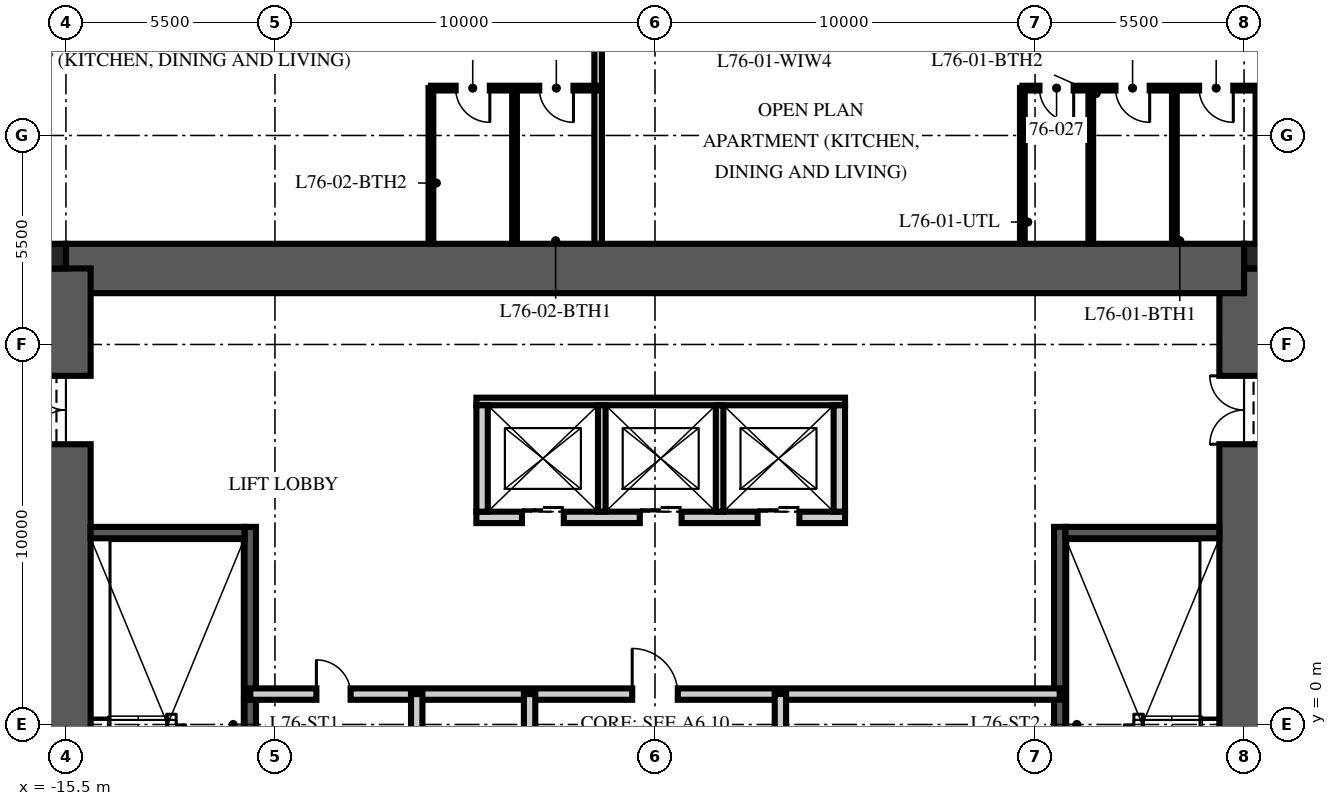
"""IFC4 building model, lengths in metres.
Left out: names, types, materials, properties, quantities, classifications, styles, units other than length and angle.
Written with IfcOpenShell. Run it as: python <this file> out.ifc"""

import sys

from ifc_helpers import new_model, si_unit, direction, frame, frame_2d, origin, origin_2d, place, context, subcontext, project, spatial, rectangle, extrude, element, fill, save


model = new_model("IFC4")
c1 = context("Model", 3, precision=1e-05, world=origin(), true_north=direction((0.0, 1.0)))
c2 = subcontext(c1, "Body", "Model", "MODEL_VIEW")
j1 = project(units=[si_unit("LENGTHUNIT", "METRE"), si_unit("PLANEANGLEUNIT", "RADIAN")], contexts=[c1])
p1 = place(None, origin())
s1 = spatial("IfcSite", under=j1, at=p1, CompositionType="ELEMENT")
p2 = place(p1, origin())
s2 = spatial("IfcBuilding", under=s1, at=p2, CompositionType="ELEMENT")
p3 = place(p2, frame((0.0, 0.0, 304.5)))
s3 = spatial("IfcBuildingStorey", under=s2, at=p3, CompositionType="ELEMENT", Elevation=304.5)
p4 = place(p3, frame((15.5, -12.0, -0.25), z_axis=(0.0, 0.0, 1.0), x_axis=(0.0, 1.0, 0.0)))
e1 = element("IfcWall", 1, at=p4, inside=s3, PredefinedType="SHEAR", context=c2, shape_type="SweptSolid", body=[
    extrude(rectangle(XDim=24.0, YDim=1.3, at=frame_2d((12.0, 0.0))), origin(), (0.0, 0.0, 1.0), 3.75),
])
p5 = place(p4, frame((3.125, 0.0, 0.25)))
e2 = element("IfcOpeningElement", 2, at=p5, cuts=e1, PredefinedType="OPENING", context=c2, shape_type="SweptSolid", body=[
    extrude(rectangle(XDim=1.2, YDim=2.1, at=frame_2d((0.6, 1.05))), frame((0.0, 0.66, 0.0), z_axis=(0.0, -1.0, 0.0), x_axis=(1.0, 0.0, 0.0)), (0.0, 0.0, 1.0), 1.32),
])
p6 = place(p4, frame((19.375, 0.0, 0.25)))
e3 = element("IfcOpeningElement", 3, at=p6, cuts=e1, PredefinedType="OPENING", context=c2, shape_type="SweptSolid", body=[
    extrude(rectangle(XDim=1.8, YDim=2.1, at=frame_2d((0.9, 1.05))), frame((0.0, 0.66, 0.0), z_axis=(0.0, -1.0, 0.0), x_axis=(1.0, 0.0, 0.0)), (0.0, 0.0, 1.0), 1.32),
])
p7 = place(p3, frame((-15.5, 12.0, -0.25), z_axis=(0.0, 0.0, 1.0), x_axis=(1.0, 0.0, 0.0)))
e4 = element("IfcWall", 4, at=p7, inside=s3, PredefinedType="SHEAR", context=c2, shape_type="SweptSolid", body=[
    extrude(rectangle(XDim=31.0, YDim=1.3, at=frame_2d((15.5, 0.0))), origin(), (0.0, 0.0, 1.0), 3.75),
])
p8 = place(p3, frame((-15.5, -12.0, -0.25), z_axis=(0.0, 0.0, 1.0), x_axis=(0.0, 1.0, 0.0)))
e5 = element("IfcWall", 5, at=p8, inside=s3, PredefinedType="SHEAR", context=c2, shape_type="SweptSolid", body=[
    extrude(rectangle(XDim=24.0, YDim=1.3, at=frame_2d((12.0, 0.0))), origin(), (0.0, 0.0, 1.0), 3.75),
])
p9 = place(p8, frame((3.125, 0.0, 0.25)))
e6 = element("IfcOpeningElement", 6, at=p9, cuts=e5, PredefinedType="OPENING", context=c2, shape_type="SweptSolid", body=[
    extrude(rectangle(XDim=1.2, YDim=2.1, at=frame_2d((0.6, 1.05))), frame((0.0, 0.66, 0.0), z_axis=(0.0, -1.0, 0.0), x_axis=(1.0, 0.0, 0.0)), (0.0, 0.0, 1.0), 1.32),
])
p10 = place(p8, frame((19.375, 0.0, 0.25)))
e7 = element("IfcOpeningElement", 7, at=p10, cuts=e5, PredefinedType="OPENING", context=c2, shape_type="SweptSolid", body=[
    extrude(rectangle(XDim=1.8, YDim=2.1, at=frame_2d((0.9, 1.05))), frame((0.0, 0.66, 0.0), z_axis=(0.0, -1.0, 0.0), x_axis=(1.0, 0.0, 0.0)), (0.0, 0.0, 1.0), 1.32),
])
for number, where, z_axis, x_axis in (
    (8, (15.825, 12.325, -0.25), (0.0, 0.0, 1.0), (1.0, 0.0, 0.0)),
    (9, (-15.825, 12.325, -0.25), (0.0, 0.0, 1.0), (1.0, 0.0, 0.0)),
):
    element("IfcColumn", number, at=place(p3, frame(where, z_axis=z_axis, x_axis=x_axis)), inside=s3, PredefinedType="COLUMN", context=c2, shape_type="SweptSolid", body=[
        extrude(rectangle(XDim=0.65, YDim=0.65, at=origin_2d()), origin(), (0.0, 0.0, 1.0), 3.75),
    ])
p11 = place(p3, frame((-10.65, -4.9, 0.0), z_axis=(0.0, 0.0, 1.0), x_axis=(0.0, 1.0, 0.0)))
e10 = element("IfcWall", 10, at=p11, inside=s3, PredefinedType="SOLIDWALL", context=c2, shape_type="SweptSolid", body=[
    extrude(rectangle(XDim=10.1, YDim=0.3, at=frame_2d((5.05, 0.0))), origin(), (0.0, 0.0, 1.0), 3.5),
])
p12 = place(p3, frame((-14.85, 5.05, 0.0), z_axis=(0.0, 0.0, 1.0), x_axis=(1.0, 0.0, 0.0)))
e11 = element("IfcWall", 11, at=p12, inside=s3, PredefinedType="SOLIDWALL", context=c2, shape_type="SweptSolid", body=[
    extrude(rectangle(XDim=4.05, YDim=0.3, at=frame_2d((2.025, 0.0))), origin(), (0.0, 0.0, 1.0), 3.5),
])
p13 = place(p3, frame((10.65, -4.9, 0.0), z_axis=(0.0, 0.0, 1.0), x_axis=(0.0, 1.0, 0.0)))
e12 = element("IfcWall", 12, at=p13, inside=s3, PredefinedType="SOLIDWALL", context=c2, shape_type="SweptSolid", body=[
    extrude(rectangle(XDim=10.1, YDim=0.3, at=frame_2d((5.05, 0.0))), origin(), (0.0, 0.0, 1.0), 3.5),
])
p14 = place(p3, frame((14.85, 5.05, 0.0), z_axis=(0.0, 0.0, 1.0), x_axis=(-1.0, 0.0, 0.0)))
e13 = element("IfcWall", 13, at=p14, inside=s3, PredefinedType="SOLIDWALL", context=c2, shape_type="SweptSolid", body=[
    extrude(rectangle(XDim=4.05, YDim=0.3, at=frame_2d((2.025, 0.0))), origin(), (0.0, 0.0, 1.0), 3.5),
])
p15 = place(p3, frame((-4.7, 5.45, 0.0), z_axis=(0.0, 0.0, 1.0), x_axis=(1.0, 0.0, 0.0)))
e14 = element("IfcWall", 14, at=p15, inside=s3, PredefinedType="PARTITIONING", context=c2, shape_type="SweptSolid", body=[
    extrude(rectangle(XDim=9.7, YDim=0.3, at=frame_2d((4.85, 0.0))), origin(), (0.0, 0.0, 1.0), 3.5),
])
p16 = place(p15, frame((1.2, 0.0, 0.0)))
e15 = element("IfcOpeningElement", 15, at=p16, cuts=e14, PredefinedType="OPENING", context=c2, shape_type="SweptSolid", body=[
    extrude(rectangle(XDim=1.1, YDim=2.1, at=frame_2d((0.55, 1.05))), frame((0.0, 0.16, 0.0), z_axis=(0.0, -1.0, 0.0), x_axis=(1.0, 0.0, 0.0)), (0.0, 0.0, 1.0), 0.32),
])
p17 = place(p15, frame((4.3, 0.0, 0.0)))
e16 = element("IfcOpeningElement", 16, at=p17, cuts=e14, PredefinedType="OPENING", context=c2, shape_type="SweptSolid", body=[
    extrude(rectangle(XDim=1.1, YDim=2.1, at=frame_2d((0.55, 1.05))), frame((0.0, 0.16, 0.0), z_axis=(0.0, -1.0, 0.0), x_axis=(1.0, 0.0, 0.0)), (0.0, 0.0, 1.0), 0.32),
])
p18 = place(p15, frame((7.4, 0.0, 0.0)))
e17 = element("IfcOpeningElement", 17, at=p18, cuts=e14, PredefinedType="OPENING", context=c2, shape_type="SweptSolid", body=[
    extrude(rectangle(XDim=1.1, YDim=2.1, at=frame_2d((0.55, 1.05))), frame((0.0, 0.16, 0.0), z_axis=(0.0, -1.0, 0.0), x_axis=(1.0, 0.0, 0.0)), (0.0, 0.0, 1.0), 0.32),
])
p19 = place(p3, frame((-4.7, 8.5, 0.0), z_axis=(0.0, 0.0, 1.0), x_axis=(1.0, 0.0, 0.0)))
e18 = element("IfcWall", 18, at=p19, inside=s3, PredefinedType="PARTITIONING", context=c2, shape_type="SweptSolid", body=[
    extrude(rectangle(XDim=9.7, YDim=0.2, at=frame_2d((4.85, 0.0))), origin(), (0.0, 0.0, 1.0), 3.5),
])
for number, where, z_axis, x_axis in (
    (19, (-4.55, 5.6, 0.0), (0.0, 0.0, 1.0), (0.0, 1.0, 0.0)),
    (20, (4.85, 5.6, 0.0), (0.0, 0.0, 1.0), (0.0, 1.0, 0.0)),
):
    element("IfcWall", number, at=place(p3, frame(where, z_axis=z_axis, x_axis=x_axis)), inside=s3, PredefinedType="PARTITIONING", context=c2, shape_type="SweptSolid", body=[
        extrude(rectangle(XDim=2.8, YDim=0.3, at=frame_2d((1.4, 0.0))), origin(), (0.0, 0.0, 1.0), 3.5),
    ])
for number, where, z_axis, x_axis in (
    (21, (-1.4, 5.6, 0.0), (0.0, 0.0, 1.0), (0.0, 1.0, 0.0)),
    (22, (1.7, 5.6, 0.0), (0.0, 0.0, 1.0), (0.0, 1.0, 0.0)),
):
    element("IfcWall", number, at=place(p3, frame(where, z_axis=z_axis, x_axis=x_axis)), inside=s3, PredefinedType="PARTITIONING", context=c2, shape_type="SweptSolid", body=[
        extrude(rectangle(XDim=2.8, YDim=0.2, at=frame_2d((1.4, 0.0))), origin(), (0.0, 0.0, 1.0), 3.5),
    ])
p20 = place(p3, frame((-10.65, 0.8, 0.0), z_axis=(0.0, 0.0, 1.0), x_axis=(1.0, 0.0, 0.0)))
e23 = element("IfcWall", 23, at=p20, inside=s3, PredefinedType="PARTITIONING", context=c2, shape_type="SweptSolid", body=[
    extrude(rectangle(XDim=21.3, YDim=0.3, at=frame_2d((10.65, 0.0))), origin(), (0.0, 0.0, 1.0), 3.5),
])
p21 = place(p20, frame((10.05, 0.0, 0.0)))
e24 = element("IfcOpeningElement", 24, at=p21, cuts=e23, PredefinedType="OPENING", context=c2, shape_type="SweptSolid", body=[
    extrude(rectangle(XDim=1.2, YDim=2.1, at=frame_2d((0.6, 1.05))), frame((0.0, 0.16, 0.0), z_axis=(0.0, -1.0, 0.0), x_axis=(1.0, 0.0, 0.0)), (0.0, 0.0, 1.0), 0.32),
])
p22 = place(p20, frame((1.74, 0.0, 0.0)))
e25 = element("IfcOpeningElement", 25, at=p22, cuts=e23, PredefinedType="OPENING", context=c2, shape_type="SweptSolid", body=[
    extrude(rectangle(XDim=0.9, YDim=2.1, at=frame_2d((0.45, 1.05))), frame((0.0, 0.16, 0.0), z_axis=(0.0, -1.0, 0.0), x_axis=(1.0, 0.0, 0.0)), (0.0, 0.0, 1.0), 0.32),
])
p23 = place(p3, frame((-3.3, -6.65, 0.0), z_axis=(0.0, 0.0, 1.0), x_axis=(0.0, 1.0, 0.0)))
e26 = element("IfcWall", 26, at=p23, inside=s3, PredefinedType="PARTITIONING", context=c2, shape_type="SweptSolid", body=[
    extrude(rectangle(XDim=7.45, YDim=0.3, at=frame_2d((3.725, 0.0))), origin(), (0.0, 0.0, 1.0), 3.5),
])
p24 = place(p23, frame((3.275, 0.0, 0.0)))
e27 = element("IfcOpeningElement", 27, at=p24, cuts=e26, PredefinedType="OPENING", context=c2, shape_type="SweptSolid", body=[
    extrude(rectangle(XDim=0.9, YDim=2.1, at=frame_2d((0.45, 1.05))), frame((0.0, 0.16, 0.0), z_axis=(0.0, -1.0, 0.0), x_axis=(1.0, 0.0, 0.0)), (0.0, 0.0, 1.0), 0.32),
])
p25 = place(p3, frame((3.3, -6.65, 0.0), z_axis=(0.0, 0.0, 1.0), x_axis=(0.0, 1.0, 0.0)))
e28 = element("IfcWall", 28, at=p25, inside=s3, PredefinedType="PARTITIONING", context=c2, shape_type="SweptSolid", body=[
    extrude(rectangle(XDim=7.45, YDim=0.3, at=frame_2d((3.725, 0.0))), origin(), (0.0, 0.0, 1.0), 3.5),
])
p26 = place(p25, frame((1.231, 0.0, 0.0)))
e29 = element("IfcOpeningElement", 29, at=p26, cuts=e28, PredefinedType="OPENING", context=c2, shape_type="SweptSolid", body=[
    extrude(rectangle(XDim=0.9, YDim=2.1, at=frame_2d((0.45, 1.05))), frame((0.0, 0.16, 0.0), z_axis=(0.0, -1.0, 0.0), x_axis=(1.0, 0.0, 0.0)), (0.0, 0.0, 1.0), 0.32),
])
p27 = place(p25, frame((4.956, 0.0, 0.0)))
e30 = element("IfcOpeningElement", 30, at=p27, cuts=e28, PredefinedType="OPENING", context=c2, shape_type="SweptSolid", body=[
    extrude(rectangle(XDim=0.9, YDim=2.1, at=frame_2d((0.45, 1.05))), frame((0.0, 0.16, 0.0), z_axis=(0.0, -1.0, 0.0), x_axis=(1.0, 0.0, 0.0)), (0.0, 0.0, 1.0), 0.32),
])
p28 = place(p3, frame((-6.27, -6.65, 0.0), z_axis=(0.0, 0.0, 1.0), x_axis=(0.0, 1.0, 0.0)))
e31 = element("IfcWall", 31, at=p28, inside=s3, PredefinedType="PARTITIONING", context=c2, shape_type="SweptSolid", body=[
    extrude(rectangle(XDim=7.45, YDim=0.3, at=frame_2d((3.725, 0.0))), origin(), (0.0, 0.0, 1.0), 3.5),
])
p29 = place(p3, frame((-1.496, 12.65, 0.0), z_axis=(0.0, 0.0, 1.0), x_axis=(0.0, 1.0, 0.0)))
e32 = element("IfcWall", 32, at=p29, inside=s3, PredefinedType="PARTITIONING", context=c2, shape_type="SweptSolid", body=[
    extrude(rectangle(XDim=10.85, YDim=0.2, at=frame_2d((5.425, 0.0))), origin(), (0.0, 0.0, 1.0), 3.01),
])
p30 = place(p3, frame((15.866, 16.746, 0.0), z_axis=(0.0, 0.0, 1.0), x_axis=(-1.0, 0.0, 0.0)))
e33 = element("IfcWall", 33, at=p30, inside=s3, PredefinedType="PARTITIONING", context=c2, shape_type="SweptSolid", body=[
    extrude(rectangle(XDim=6.2, YDim=0.125, at=frame_2d((3.1, 0.0))), origin(), (0.0, 0.0, 1.0), 2.9),
])
p31 = place(p30, frame((0.65, 0.0, 0.0)))
e34 = element("IfcOpeningElement", 34, at=p31, cuts=e33, PredefinedType="OPENING", context=c2, shape_type="SweptSolid", body=[
    extrude(rectangle(XDim=0.9, YDim=2.1, at=frame_2d((0.45, 1.05))), frame((0.0, 0.073, 0.0), z_axis=(0.0, -1.0, 0.0), x_axis=(1.0, 0.0, 0.0)), (0.0, 0.0, 1.0), 0.145),
])
p32 = place(p30, frame((2.85, 0.0, 0.0)))
e35 = element("IfcOpeningElement", 35, at=p32, cuts=e33, PredefinedType="OPENING", context=c2, shape_type="SweptSolid", body=[
    extrude(rectangle(XDim=0.9, YDim=2.1, at=frame_2d((0.45, 1.05))), frame((0.0, 0.073, 0.0), z_axis=(0.0, -1.0, 0.0), x_axis=(1.0, 0.0, 0.0)), (0.0, 0.0, 1.0), 0.145),
])
p33 = place(p30, frame((4.85, 0.0, 0.0)))
e36 = element("IfcOpeningElement", 36, at=p33, cuts=e33, PredefinedType="OPENING", context=c2, shape_type="SweptSolid", body=[
    extrude(rectangle(XDim=0.9, YDim=2.1, at=frame_2d((0.45, 1.05))), frame((0.0, 0.073, 0.0), z_axis=(0.0, -1.0, 0.0), x_axis=(1.0, 0.0, 0.0)), (0.0, 0.0, 1.0), 0.145),
])
p34 = place(p3, frame((15.866, 12.65, 0.0), z_axis=(0.0, 0.0, 1.0), x_axis=(0.0, 1.0, 0.0)))
e37 = element("IfcWall", 37, at=p34, inside=s3, PredefinedType="PARTITIONING", context=c2, shape_type="SweptSolid", body=[
    extrude(rectangle(XDim=4.096, YDim=0.125, at=frame_2d((2.048, 0.0))), origin(), (0.0, 0.0, 1.0), 2.6),
])
for number, where, z_axis, x_axis in (
    (38, (13.667, 12.65, 0.0), (0.0, 0.0, 1.0), (0.0, 1.0, 0.0)),
    (39, (11.467, 12.65, 0.0), (0.0, 0.0, 1.0), (0.0, 1.0, 0.0)),
    (40, (9.667, 12.65, 0.0), (0.0, 0.0, 1.0), (0.0, 1.0, 0.0)),
):
    element("IfcWall", number, at=place(p3, frame(where, z_axis=z_axis, x_axis=x_axis)), inside=s3, PredefinedType="PARTITIONING", context=c2, shape_type="SweptSolid", body=[
        extrude(rectangle(XDim=4.096, YDim=0.125, at=frame_2d((2.048, 0.0))), origin(), (0.0, 0.0, 1.0), 3.5),
    ])
p35 = place(p3, frame((-1.496, 16.746, 0.0), z_axis=(0.0, 0.0, 1.0), x_axis=(-1.0, 0.0, 0.0)))
e41 = element("IfcWall", 41, at=p35, inside=s3, PredefinedType="PARTITIONING", context=c2, shape_type="SweptSolid", body=[
    extrude(rectangle(XDim=4.4, YDim=0.125, at=frame_2d((2.2, 0.0))), origin(), (0.0, 0.0, 1.0), 2.91),
])
p36 = place(p35, frame((0.65, 0.0, 0.0)))
e42 = element("IfcOpeningElement", 42, at=p36, cuts=e41, PredefinedType="OPENING", context=c2, shape_type="SweptSolid", body=[
    extrude(rectangle(XDim=0.9, YDim=2.1, at=frame_2d((0.45, 1.05))), frame((0.0, 0.073, 0.0), z_axis=(0.0, -1.0, 0.0), x_axis=(1.0, 0.0, 0.0)), (0.0, 0.0, 1.0), 0.145),
])
p37 = place(p35, frame((2.85, 0.0, 0.0)))
e43 = element("IfcOpeningElement", 43, at=p37, cuts=e41, PredefinedType="OPENING", context=c2, shape_type="SweptSolid", body=[
    extrude(rectangle(XDim=0.9, YDim=2.1, at=frame_2d((0.45, 1.05))), frame((0.0, 0.073, 0.0), z_axis=(0.0, -1.0, 0.0), x_axis=(1.0, 0.0, 0.0)), (0.0, 0.0, 1.0), 0.145),
])
p38 = place(p3, frame((-3.696, 12.65, 0.0), z_axis=(0.0, 0.0, 1.0), x_axis=(0.0, 1.0, 0.0)))
e44 = element("IfcWall", 44, at=p38, inside=s3, PredefinedType="PARTITIONING", context=c2, shape_type="SweptSolid", body=[
    extrude(rectangle(XDim=4.096, YDim=0.125, at=frame_2d((2.048, 0.0))), origin(), (0.0, 0.0, 1.0), 2.91),
])
p39 = place(p3, frame((-5.896, 12.65, 0.0), z_axis=(0.0, 0.0, 1.0), x_axis=(0.0, 1.0, 0.0)))
e45 = element("IfcWall", 45, at=p39, inside=s3, PredefinedType="PARTITIONING", context=c2, shape_type="SweptSolid", body=[
    extrude(rectangle(XDim=4.096, YDim=0.125, at=frame_2d((2.048, 0.0))), origin(), (0.0, 0.0, 1.0), 3.5),
])
p40 = place(p10, origin())
e46 = element("IfcDoor", 46, at=p40, inside=s3, OperationType="DOUBLE_DOOR_SINGLE_SWING", PredefinedType="DOOR", context=c2, shape_type="SweptSolid", body=[
    extrude(rectangle(XDim=1.8, YDim=2.1, at=frame_2d((0.9, 1.05))), frame((0.0, 0.025, 0.0), z_axis=(0.0, -1.0, 0.0), x_axis=(1.0, 0.0, 0.0)), (0.0, 0.0, 1.0), 0.05),
])
fill(e7, e46)
p41 = place(p6, origin())
e47 = element("IfcDoor", 47, at=p41, inside=s3, OperationType="DOUBLE_DOOR_SINGLE_SWING", PredefinedType="DOOR", context=c2, shape_type="SweptSolid", body=[
    extrude(rectangle(XDim=1.8, YDim=2.1, at=frame_2d((0.9, 1.05))), frame((0.0, 0.025, 0.0), z_axis=(0.0, -1.0, 0.0), x_axis=(1.0, 0.0, 0.0)), (0.0, 0.0, 1.0), 0.05),
])
fill(e3, e47)
p42 = place(p16, origin())
e48 = element("IfcDoor", 48, at=p42, inside=s3, OperationType="DOUBLE_DOOR_SLIDING", PredefinedType="DOOR", context=c2, shape_type="SweptSolid", body=[
    extrude(rectangle(XDim=1.1, YDim=2.1, at=frame_2d((0.55, 1.05))), frame((0.0, 0.025, 0.0), z_axis=(0.0, -1.0, 0.0), x_axis=(1.0, 0.0, 0.0)), (0.0, 0.0, 1.0), 0.05),
])
fill(e15, e48)
p43 = place(p17, origin())
e49 = element("IfcDoor", 49, at=p43, inside=s3, OperationType="DOUBLE_DOOR_SLIDING", PredefinedType="DOOR", context=c2, shape_type="SweptSolid", body=[
    extrude(rectangle(XDim=1.1, YDim=2.1, at=frame_2d((0.55, 1.05))), frame((0.0, 0.025, 0.0), z_axis=(0.0, -1.0, 0.0), x_axis=(1.0, 0.0, 0.0)), (0.0, 0.0, 1.0), 0.05),
])
fill(e16, e49)
p44 = place(p18, origin())
e50 = element("IfcDoor", 50, at=p44, inside=s3, OperationType="DOUBLE_DOOR_SLIDING", PredefinedType="DOOR", context=c2, shape_type="SweptSolid", body=[
    extrude(rectangle(XDim=1.1, YDim=2.1, at=frame_2d((0.55, 1.05))), frame((0.0, 0.025, 0.0), z_axis=(0.0, -1.0, 0.0), x_axis=(1.0, 0.0, 0.0)), (0.0, 0.0, 1.0), 0.05),
])
fill(e17, e50)
p45 = place(p21, origin())
e51 = element("IfcDoor", 51, at=p45, inside=s3, OperationType="SINGLE_SWING_LEFT", PredefinedType="DOOR", context=c2, shape_type="SweptSolid", body=[
    extrude(rectangle(XDim=1.2, YDim=2.1, at=frame_2d((0.6, 1.05))), frame((0.0, 0.025, 0.0), z_axis=(0.0, -1.0, 0.0), x_axis=(1.0, 0.0, 0.0)), (0.0, 0.0, 1.0), 0.05),
])
fill(e24, e51)
p46 = place(p22, origin())
e52 = element("IfcDoor", 52, at=p46, inside=s3, OperationType="SINGLE_SWING_LEFT", PredefinedType="DOOR", context=c2, shape_type="SweptSolid", body=[
    extrude(rectangle(XDim=0.9, YDim=2.1, at=frame_2d((0.45, 1.05))), frame((0.0, 0.025, 0.0), z_axis=(0.0, -1.0, 0.0), x_axis=(1.0, 0.0, 0.0)), (0.0, 0.0, 1.0), 0.05),
])
fill(e25, e52)
p47 = place(p31, origin())
e53 = element("IfcDoor", 53, at=p47, inside=s3, OperationType="SINGLE_SWING_LEFT", PredefinedType="DOOR", context=c2, shape_type="SweptSolid", body=[
    extrude(rectangle(XDim=0.9, YDim=2.1, at=frame_2d((0.45, 1.05))), frame((0.0, 0.025, 0.0), z_axis=(0.0, -1.0, 0.0), x_axis=(1.0, 0.0, 0.0)), (0.0, 0.0, 1.0), 0.05),
])
fill(e34, e53)
p48 = place(p32, origin())
e54 = element("IfcDoor", 54, at=p48, inside=s3, OperationType="SINGLE_SWING_LEFT", PredefinedType="DOOR", context=c2, shape_type="SweptSolid", body=[
    extrude(rectangle(XDim=0.9, YDim=2.1, at=frame_2d((0.45, 1.05))), frame((0.0, 0.025, 0.0), z_axis=(0.0, -1.0, 0.0), x_axis=(1.0, 0.0, 0.0)), (0.0, 0.0, 1.0), 0.05),
])
fill(e35, e54)
p49 = place(p33, origin())
e55 = element("IfcDoor", 55, at=p49, inside=s3, OperationType="SINGLE_SWING_LEFT", PredefinedType="DOOR", context=c2, shape_type="SweptSolid", body=[
    extrude(rectangle(XDim=0.9, YDim=2.1, at=frame_2d((0.45, 1.05))), frame((0.0, 0.025, 0.0), z_axis=(0.0, -1.0, 0.0), x_axis=(1.0, 0.0, 0.0)), (0.0, 0.0, 1.0), 0.05),
])
fill(e36, e55)
p50 = place(p36, origin())
e56 = element("IfcDoor", 56, at=p50, inside=s3, OperationType="SINGLE_SWING_LEFT", PredefinedType="DOOR", context=c2, shape_type="SweptSolid", body=[
    extrude(rectangle(XDim=0.9, YDim=2.1, at=frame_2d((0.45, 1.05))), frame((0.0, 0.025, 0.0), z_axis=(0.0, -1.0, 0.0), x_axis=(1.0, 0.0, 0.0)), (0.0, 0.0, 1.0), 0.05),
])
fill(e42, e56)
p51 = place(p37, origin())
e57 = element("IfcDoor", 57, at=p51, inside=s3, OperationType="SINGLE_SWING_LEFT", PredefinedType="DOOR", context=c2, shape_type="SweptSolid", body=[
    extrude(rectangle(XDim=0.9, YDim=2.1, at=frame_2d((0.45, 1.05))), frame((0.0, 0.025, 0.0), z_axis=(0.0, -1.0, 0.0), x_axis=(1.0, 0.0, 0.0)), (0.0, 0.0, 1.0), 0.05),
])
fill(e43, e57)
save(model, sys.argv[1])
